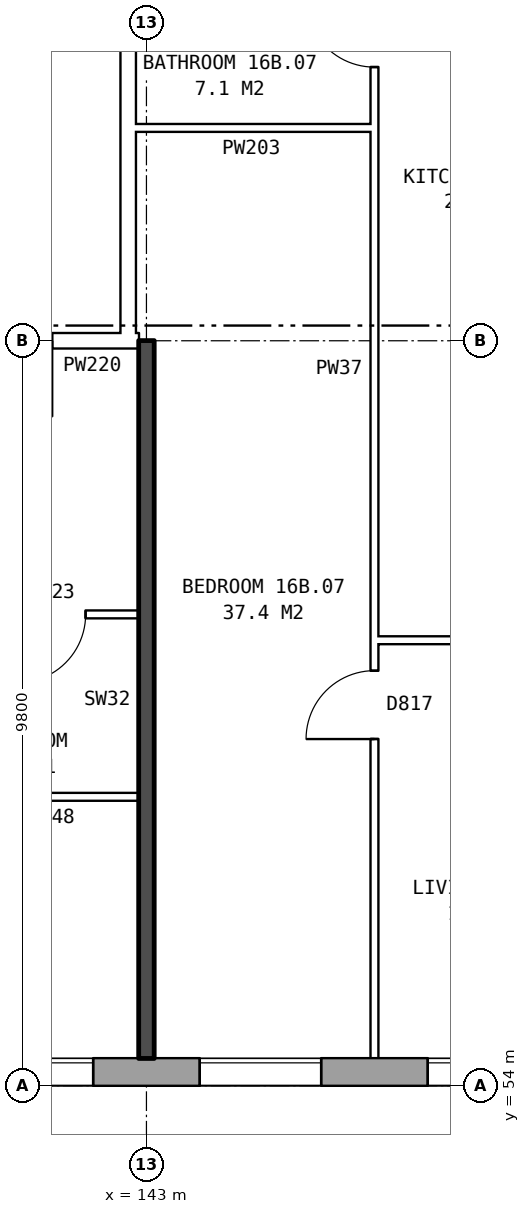
"""IFC4 building model, lengths in metres.
Left out: names, types, materials, properties, quantities, classifications, styles, units other than length and angle.
Written with IfcOpenShell. Run it as: python <this file> out.ifc"""

import sys

from ifc_helpers import new_model, si_unit, direction, frame, frame_2d, origin, place, context, subcontext, project, spatial, rectangle, extrude, element, fill, save


model = new_model("IFC4")
c1 = context("Model", 3, precision=1e-05, world=origin(), true_north=direction((0.0, 1.0)))
c2 = subcontext(c1, "Body", "Model", "MODEL_VIEW")
j1 = project(units=[si_unit("LENGTHUNIT", "METRE"), si_unit("PLANEANGLEUNIT", "RADIAN")], contexts=[c1])
p1 = place(None, origin())
s1 = spatial("IfcSite", under=j1, at=p1, CompositionType="ELEMENT")
p2 = place(p1, origin())
s2 = spatial("IfcBuilding", under=s1, at=p2, CompositionType="ELEMENT")
p3 = place(p2, frame((0.0, 0.0, 59.8)))
s3 = spatial("IfcBuildingStorey", under=s2, at=p3, CompositionType="ELEMENT", Elevation=59.8)
p4 = place(p3, frame((134.075, 54.18, 0.0), z_axis=(0.0, 0.0, 1.0), x_axis=(1.0, 0.0, 0.0)))
e1 = element("IfcWall", 1, at=p4, inside=s3, PredefinedType="STANDARD", context=c2, shape_type="SweptSolid", body=[
    extrude(rectangle(XDim=39.351, YDim=0.36, at=frame_2d((19.675, 0.0))), origin(), (0.0, 0.0, 1.0), 2.85),
])
p5 = place(p4, frame((0.625, 0.0, 0.8)))
e2 = element("IfcOpeningElement", 2, at=p5, cuts=e1, PredefinedType="OPENING", context=c2, shape_type="SweptSolid", body=[
    extrude(rectangle(XDim=1.6, YDim=1.8, at=frame_2d((0.8, 0.9))), frame((0.0, 0.19, 0.0), z_axis=(0.0, -1.0, 0.0), x_axis=(1.0, 0.0, 0.0)), (0.0, 0.0, 1.0), 0.38),
])
p6 = place(p4, frame((3.625, 0.0, 0.8)))
e3 = element("IfcOpeningElement", 3, at=p6, cuts=e1, PredefinedType="OPENING", context=c2, shape_type="SweptSolid", body=[
    extrude(rectangle(XDim=1.6, YDim=1.8, at=frame_2d((0.8, 0.9))), frame((0.0, 0.19, 0.0), z_axis=(0.0, -1.0, 0.0), x_axis=(1.0, 0.0, 0.0)), (0.0, 0.0, 1.0), 0.38),
])
p7 = place(p4, frame((6.625, 0.0, 0.8)))
e4 = element("IfcOpeningElement", 4, at=p7, cuts=e1, PredefinedType="OPENING", context=c2, shape_type="SweptSolid", body=[
    extrude(rectangle(XDim=1.6, YDim=1.8, at=frame_2d((0.8, 0.9))), frame((0.0, 0.19, 0.0), z_axis=(0.0, -1.0, 0.0), x_axis=(1.0, 0.0, 0.0)), (0.0, 0.0, 1.0), 0.38),
])
p8 = place(p4, frame((9.625, 0.0, 0.8)))
e5 = element("IfcOpeningElement", 5, at=p8, cuts=e1, PredefinedType="OPENING", context=c2, shape_type="SweptSolid", body=[
    extrude(rectangle(XDim=1.6, YDim=1.8, at=frame_2d((0.8, 0.9))), frame((0.0, 0.19, 0.0), z_axis=(0.0, -1.0, 0.0), x_axis=(1.0, 0.0, 0.0)), (0.0, 0.0, 1.0), 0.38),
])
p9 = place(p4, frame((12.625, 0.0, 0.8)))
e6 = element("IfcOpeningElement", 6, at=p9, cuts=e1, PredefinedType="OPENING", context=c2, shape_type="SweptSolid", body=[
    extrude(rectangle(XDim=1.6, YDim=1.8, at=frame_2d((0.8, 0.9))), frame((0.0, 0.19, 0.0), z_axis=(0.0, -1.0, 0.0), x_axis=(1.0, 0.0, 0.0)), (0.0, 0.0, 1.0), 0.38),
])
p10 = place(p4, frame((15.125, 0.0, 0.8)))
e7 = element("IfcOpeningElement", 7, at=p10, cuts=e1, PredefinedType="OPENING", context=c2, shape_type="SweptSolid", body=[
    extrude(rectangle(XDim=1.6, YDim=1.8, at=frame_2d((0.8, 0.9))), frame((0.0, 0.19, 0.0), z_axis=(0.0, -1.0, 0.0), x_axis=(1.0, 0.0, 0.0)), (0.0, 0.0, 1.0), 0.38),
])
p11 = place(p4, frame((18.275, 0.0, 0.15)))
e8 = element("IfcOpeningElement", 8, at=p11, cuts=e1, PredefinedType="OPENING", context=c2, shape_type="SweptSolid", body=[
    extrude(rectangle(XDim=0.6, YDim=0.9, at=frame_2d((0.3, 0.45))), frame((0.0, 0.19, 0.0), z_axis=(0.0, -1.0, 0.0), x_axis=(1.0, 0.0, 0.0)), (0.0, 0.0, 1.0), 0.38),
])
p12 = place(p4, frame((21.525, 0.0, 1.7)))
e9 = element("IfcOpeningElement", 9, at=p12, cuts=e1, PredefinedType="OPENING", context=c2, shape_type="SweptSolid", body=[
    extrude(rectangle(XDim=0.6, YDim=0.9, at=frame_2d((0.3, 0.45))), frame((0.0, 0.19, 0.0), z_axis=(0.0, -1.0, 0.0), x_axis=(1.0, 0.0, 0.0)), (0.0, 0.0, 1.0), 0.38),
])
p13 = place(p4, frame((24.625, 0.0, 0.8)))
e10 = element("IfcOpeningElement", 10, at=p13, cuts=e1, PredefinedType="OPENING", context=c2, shape_type="SweptSolid", body=[
    extrude(rectangle(XDim=1.6, YDim=1.8, at=frame_2d((0.8, 0.9))), frame((0.0, 0.19, 0.0), z_axis=(0.0, -1.0, 0.0), x_axis=(1.0, 0.0, 0.0)), (0.0, 0.0, 1.0), 0.38),
])
p14 = place(p4, frame((27.625, 0.0, 0.8)))
e11 = element("IfcOpeningElement", 11, at=p14, cuts=e1, PredefinedType="OPENING", context=c2, shape_type="SweptSolid", body=[
    extrude(rectangle(XDim=1.6, YDim=1.8, at=frame_2d((0.8, 0.9))), frame((0.0, 0.19, 0.0), z_axis=(0.0, -1.0, 0.0), x_axis=(1.0, 0.0, 0.0)), (0.0, 0.0, 1.0), 0.38),
])
p15 = place(p4, frame((30.625, 0.0, 0.8)))
e12 = element("IfcOpeningElement", 12, at=p15, cuts=e1, PredefinedType="OPENING", context=c2, shape_type="SweptSolid", body=[
    extrude(rectangle(XDim=1.6, YDim=1.8, at=frame_2d((0.8, 0.9))), frame((0.0, 0.19, 0.0), z_axis=(0.0, -1.0, 0.0), x_axis=(1.0, 0.0, 0.0)), (0.0, 0.0, 1.0), 0.38),
])
p16 = place(p4, frame((33.625, 0.0, 0.8)))
e13 = element("IfcOpeningElement", 13, at=p16, cuts=e1, PredefinedType="OPENING", context=c2, shape_type="SweptSolid", body=[
    extrude(rectangle(XDim=1.6, YDim=1.8, at=frame_2d((0.8, 0.9))), frame((0.0, 0.19, 0.0), z_axis=(0.0, -1.0, 0.0), x_axis=(1.0, 0.0, 0.0)), (0.0, 0.0, 1.0), 0.38),
])
p17 = place(p4, frame((36.625, 0.0, 0.8)))
e14 = element("IfcOpeningElement", 14, at=p17, cuts=e1, PredefinedType="OPENING", context=c2, shape_type="SweptSolid", body=[
    extrude(rectangle(XDim=1.6, YDim=1.8, at=frame_2d((0.8, 0.9))), frame((0.0, 0.19, 0.0), z_axis=(0.0, -1.0, 0.0), x_axis=(1.0, 0.0, 0.0)), (0.0, 0.0, 1.0), 0.38),
])
p18 = place(p4, frame((17.025, 0.0, 1.6)))
e15 = element("IfcOpeningElement", 15, at=p18, cuts=e1, PredefinedType="OPENING", context=c2, shape_type="SweptSolid", body=[
    extrude(rectangle(XDim=0.6, YDim=0.9, at=frame_2d((0.3, 0.45))), frame((0.0, 0.19, 0.0), z_axis=(0.0, -1.0, 0.0), x_axis=(1.0, 0.0, 0.0)), (0.0, 0.0, 1.0), 0.38),
])
p19 = place(p4, frame((19.175, 0.0, 0.25)))
e16 = element("IfcOpeningElement", 16, at=p19, cuts=e1, PredefinedType="OPENING", context=c2, shape_type="SweptSolid", body=[
    extrude(rectangle(XDim=1.4, YDim=1.2, at=frame_2d((0.7, 0.6))), frame((0.0, 0.19, 0.0), z_axis=(0.0, -1.0, 0.0), x_axis=(1.0, 0.0, 0.0)), (0.0, 0.0, 1.0), 0.38),
])
p20 = place(p4, frame((22.425, 0.0, 1.0)))
e17 = element("IfcOpeningElement", 17, at=p20, cuts=e1, PredefinedType="OPENING", context=c2, shape_type="SweptSolid", body=[
    extrude(rectangle(XDim=0.6, YDim=1.5, at=frame_2d((0.3, 0.75))), frame((0.0, 0.19, 0.0), z_axis=(0.0, -1.0, 0.0), x_axis=(1.0, 0.0, 0.0)), (0.0, 0.0, 1.0), 0.38),
])
p21 = place(p4, frame((23.325, 0.0, 0.8)))
e18 = element("IfcOpeningElement", 18, at=p21, cuts=e1, PredefinedType="OPENING", context=c2, shape_type="SweptSolid", body=[
    extrude(rectangle(XDim=1.0, YDim=1.8, at=frame_2d((0.5, 0.9))), frame((0.0, 0.19, 0.0), z_axis=(0.0, -1.0, 0.0), x_axis=(1.0, 0.0, 0.0)), (0.0, 0.0, 1.0), 0.38),
])
p22 = place(p3, frame((142.76, 63.9, 0.0), z_axis=(0.0, 0.0, 1.0), x_axis=(0.0, 1.0, 0.0)))
e19 = element("IfcWall", 19, at=p22, inside=s3, PredefinedType="PARTITIONING", context=c2, shape_type="SweptSolid", body=[
    extrude(rectangle(XDim=12.2, YDim=0.2, at=frame_2d((6.1, 0.0))), origin(), (0.0, 0.0, 1.0), 2.85),
])
p23 = place(p22, frame((5.1, 0.0, 0.0)))
e20 = element("IfcOpeningElement", 20, at=p23, cuts=e19, PredefinedType="OPENING", context=c2, shape_type="SweptSolid", body=[
    extrude(rectangle(XDim=2.0, YDim=2.1, at=frame_2d((1.0, 1.05))), frame((0.0, 0.11, 0.0), z_axis=(0.0, -1.0, 0.0), x_axis=(1.0, 0.0, 0.0)), (0.0, 0.0, 1.0), 0.22),
])
p24 = place(p3, frame((140.6, 57.8, 0.0), z_axis=(0.0, 0.0, 1.0), x_axis=(1.0, 0.0, 0.0)))
e21 = element("IfcWall", 21, at=p24, inside=s3, PredefinedType="PARTITIONING", context=c2, shape_type="SweptSolid", body=[
    extrude(rectangle(XDim=2.3, YDim=0.1, at=frame_2d((1.15, 0.0))), origin(), (0.0, 0.0, 1.0), 2.85),
])
p25 = place(p3, frame((146.0, 59.86, 0.0), z_axis=(0.0, 0.0, 1.0), x_axis=(1.0, 0.0, 0.0)))
e22 = element("IfcWall", 22, at=p25, inside=s3, PredefinedType="PARTITIONING", context=c2, shape_type="SweptSolid", body=[
    extrude(rectangle(XDim=6.0, YDim=0.1, at=frame_2d((3.0, 0.0))), origin(), (0.0, 0.0, 1.0), 2.85),
])
p26 = place(p25, frame((1.05, 0.0, 0.0)))
e23 = element("IfcOpeningElement", 23, at=p26, cuts=e22, PredefinedType="OPENING", context=c2, shape_type="SweptSolid", body=[
    extrude(rectangle(XDim=0.9, YDim=2.1, at=frame_2d((0.45, 1.05))), frame((0.0, 0.06, 0.0), z_axis=(0.0, -1.0, 0.0), x_axis=(1.0, 0.0, 0.0)), (0.0, 0.0, 1.0), 0.12),
])
p27 = place(p25, frame((4.05, 0.0, 0.0)))
e24 = element("IfcOpeningElement", 24, at=p27, cuts=e22, PredefinedType="OPENING", context=c2, shape_type="SweptSolid", body=[
    extrude(rectangle(XDim=0.9, YDim=2.1, at=frame_2d((0.45, 1.05))), frame((0.0, 0.06, 0.0), z_axis=(0.0, -1.0, 0.0), x_axis=(1.0, 0.0, 0.0)), (0.0, 0.0, 1.0), 0.12),
])
p28 = place(p3, frame((137.1, 60.2, 0.0), z_axis=(0.0, 0.0, 1.0), x_axis=(1.0, 0.0, 0.0)))
e25 = element("IfcWall", 25, at=p28, inside=s3, PredefinedType="PARTITIONING", context=c2, shape_type="SweptSolid", body=[
    extrude(rectangle(XDim=5.8, YDim=0.1, at=frame_2d((2.9, 0.0))), origin(), (0.0, 0.0, 1.0), 2.85),
])
p29 = place(p28, frame((1.3, 0.0, 0.0)))
e26 = element("IfcOpeningElement", 26, at=p29, cuts=e25, PredefinedType="OPENING", context=c2, shape_type="SweptSolid", body=[
    extrude(rectangle(XDim=0.9, YDim=2.1, at=frame_2d((0.45, 1.05))), frame((0.0, 0.06, 0.0), z_axis=(0.0, -1.0, 0.0), x_axis=(1.0, 0.0, 0.0)), (0.0, 0.0, 1.0), 0.12),
])
p30 = place(p28, frame((4.2, 0.0, 0.0)))
e27 = element("IfcOpeningElement", 27, at=p30, cuts=e25, PredefinedType="OPENING", context=c2, shape_type="SweptSolid", body=[
    extrude(rectangle(XDim=0.9, YDim=2.1, at=frame_2d((0.45, 1.05))), frame((0.0, 0.06, 0.0), z_axis=(0.0, -1.0, 0.0), x_axis=(1.0, 0.0, 0.0)), (0.0, 0.0, 1.0), 0.12),
])
p31 = place(p3, frame((139.76, 63.8, 0.0), z_axis=(0.0, 0.0, 1.0), x_axis=(1.0, 0.0, 0.0)))
e28 = element("IfcWall", 28, at=p31, inside=s3, PredefinedType="PARTITIONING", context=c2, shape_type="SweptSolid", body=[
    extrude(rectangle(XDim=3.0, YDim=0.2, at=frame_2d((1.5, 0.0))), origin(), (0.0, 0.0, 1.0), 2.85),
])
p32 = place(p31, frame((1.0, 0.0, 0.0)))
e29 = element("IfcOpeningElement", 29, at=p32, cuts=e28, PredefinedType="OPENING", context=c2, shape_type="SweptSolid", body=[
    extrude(rectangle(XDim=1.0, YDim=2.1, at=frame_2d((0.5, 1.05))), frame((0.0, 0.11, 0.0), z_axis=(0.0, -1.0, 0.0), x_axis=(1.0, 0.0, 0.0)), (0.0, 0.0, 1.0), 0.22),
])
p33 = place(p3, frame((142.76, 63.8, 0.0), z_axis=(0.0, 0.0, 1.0), x_axis=(1.0, 0.0, 0.0)))
e30 = element("IfcWall", 30, at=p33, inside=s3, PredefinedType="PARTITIONING", context=c2, shape_type="SweptSolid", body=[
    extrude(rectangle(XDim=0.14, YDim=0.2, at=frame_2d((0.07, 0.0))), origin(), (0.0, 0.0, 1.0), 2.85),
])
p34 = place(p3, frame((142.76, 66.6, 0.0), z_axis=(0.0, 0.0, 1.0), x_axis=(1.0, 0.0, 0.0)))
e31 = element("IfcWall", 31, at=p34, inside=s3, PredefinedType="PARTITIONING", context=c2, shape_type="SweptSolid", body=[
    extrude(rectangle(XDim=3.24, YDim=0.1, at=frame_2d((1.62, 0.0))), origin(), (0.0, 0.0, 1.0), 2.85),
])
p35 = place(p3, frame((143.0, 54.36, 0.0), z_axis=(0.0, 0.0, 1.0), x_axis=(0.0, 1.0, 0.0)))
e32 = element("IfcWall", 32, at=p35, inside=s3, PredefinedType="SOLIDWALL", context=c2, shape_type="SweptSolid", body=[
    extrude(rectangle(XDim=9.44, YDim=0.2, at=frame_2d((4.72, 0.0))), origin(), (0.0, 0.0, 1.0), 2.85),
])
p36 = place(p3, frame((146.0, 54.36, 0.0), z_axis=(0.0, 0.0, 1.0), x_axis=(0.0, 1.0, 0.0)))
e33 = element("IfcWall", 33, at=p36, inside=s3, PredefinedType="PARTITIONING", context=c2, shape_type="SweptSolid", body=[
    extrude(rectangle(XDim=14.34, YDim=0.1, at=frame_2d((7.17, 0.0))), origin(), (0.0, 0.0, 1.0), 2.85),
])
p37 = place(p36, frame((4.2, 0.0, 0.0)))
e34 = element("IfcOpeningElement", 34, at=p37, cuts=e33, PredefinedType="OPENING", context=c2, shape_type="SweptSolid", body=[
    extrude(rectangle(XDim=0.9, YDim=2.1, at=frame_2d((0.45, 1.05))), frame((0.0, 0.06, 0.0), z_axis=(0.0, -1.0, 0.0), x_axis=(1.0, 0.0, 0.0)), (0.0, 0.0, 1.0), 0.12),
])
p38 = place(p36, frame((13.04, 0.0, 0.0)))
e35 = element("IfcOpeningElement", 35, at=p38, cuts=e33, PredefinedType="OPENING", context=c2, shape_type="SweptSolid", body=[
    extrude(rectangle(XDim=0.9, YDim=2.1, at=frame_2d((0.45, 1.05))), frame((0.0, 0.06, 0.0), z_axis=(0.0, -1.0, 0.0), x_axis=(1.0, 0.0, 0.0)), (0.0, 0.0, 1.0), 0.12),
])
p39 = place(p7, origin())
e36 = element("IfcWindow", 36, at=p39, inside=s3, PartitioningType="SINGLE_PANEL", PredefinedType="WINDOW", context=c2, shape_type="SweptSolid", body=[
    extrude(rectangle(XDim=1.6, YDim=1.8, at=frame_2d((0.8, 0.9))), frame((0.0, 0.15, 0.0), z_axis=(0.0, -1.0, 0.0), x_axis=(1.0, 0.0, 0.0)), (0.0, 0.0, 1.0), 0.06),
])
fill(e4, e36)
p40 = place(p8, origin())
e37 = element("IfcWindow", 37, at=p40, inside=s3, PartitioningType="SINGLE_PANEL", PredefinedType="WINDOW", context=c2, shape_type="SweptSolid", body=[
    extrude(rectangle(XDim=1.6, YDim=1.8, at=frame_2d((0.8, 0.9))), frame((0.0, 0.15, 0.0), z_axis=(0.0, -1.0, 0.0), x_axis=(1.0, 0.0, 0.0)), (0.0, 0.0, 1.0), 0.06),
])
fill(e5, e37)
p41 = place(p9, origin())
e38 = element("IfcWindow", 38, at=p41, inside=s3, PartitioningType="SINGLE_PANEL", PredefinedType="WINDOW", context=c2, shape_type="SweptSolid", body=[
    extrude(rectangle(XDim=1.6, YDim=1.8, at=frame_2d((0.8, 0.9))), frame((0.0, 0.15, 0.0), z_axis=(0.0, -1.0, 0.0), x_axis=(1.0, 0.0, 0.0)), (0.0, 0.0, 1.0), 0.06),
])
fill(e6, e38)
p42 = place(p30, frame((0.9, 0.0, 0.0), z_axis=(0.0, 0.0, 1.0), x_axis=(-1.0, 0.0, 0.0)))
e39 = element("IfcDoor", 39, at=p42, inside=s3, OperationType="SINGLE_SWING_RIGHT", PredefinedType="DOOR", context=c2, shape_type="SweptSolid", body=[
    extrude(rectangle(XDim=0.9, YDim=2.1, at=frame_2d((0.45, 1.05))), frame((0.0, 0.025, 0.0), z_axis=(0.0, -1.0, 0.0), x_axis=(1.0, 0.0, 0.0)), (0.0, 0.0, 1.0), 0.05),
])
fill(e27, e39)
p43 = place(p37, origin())
e40 = element("IfcDoor", 40, at=p43, inside=s3, OperationType="SINGLE_SWING_LEFT", PredefinedType="DOOR", context=c2, shape_type="SweptSolid", body=[
    extrude(rectangle(XDim=0.9, YDim=2.1, at=frame_2d((0.45, 1.05))), frame((0.0, 0.025, 0.0), z_axis=(0.0, -1.0, 0.0), x_axis=(1.0, 0.0, 0.0)), (0.0, 0.0, 1.0), 0.05),
])
fill(e34, e40)
p44 = place(p38, origin())
e41 = element("IfcDoor", 41, at=p44, inside=s3, OperationType="SINGLE_SWING_RIGHT", PredefinedType="DOOR", context=c2, shape_type="SweptSolid", body=[
    extrude(rectangle(XDim=0.9, YDim=2.1, at=frame_2d((0.45, 1.05))), frame((0.0, 0.025, 0.0), z_axis=(0.0, -1.0, 0.0), x_axis=(1.0, 0.0, 0.0)), (0.0, 0.0, 1.0), 0.05),
])
fill(e35, e41)
save(model, sys.argv[1])
